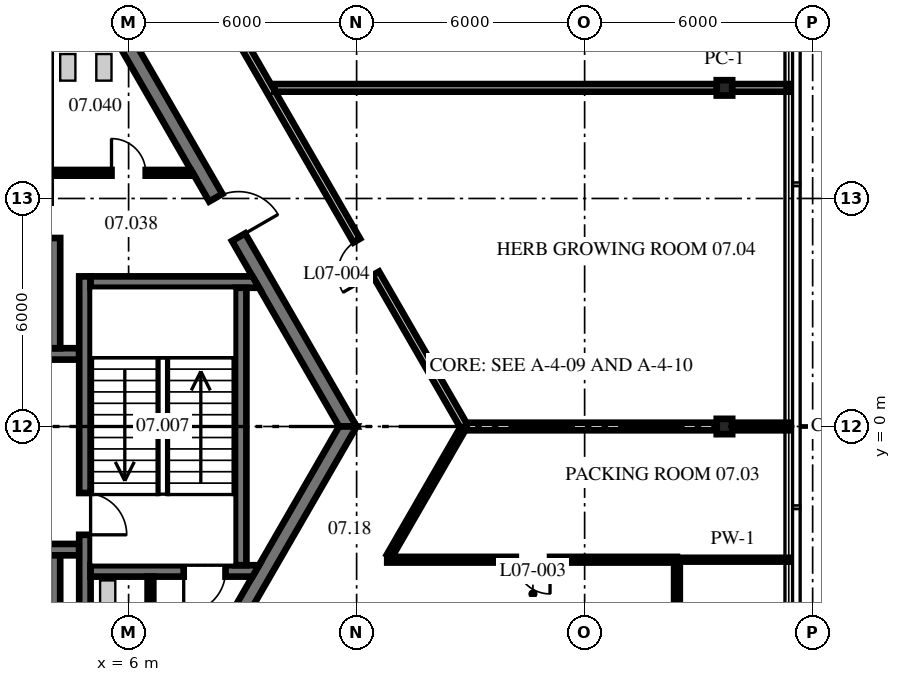
"""IFC4 building model, lengths in metres.
Left out: names, types, materials, properties, quantities, classifications, styles, units other than length and angle.
Written with IfcOpenShell. Run it as: python <this file> out.ifc"""

import sys

from ifc_helpers import new_model, si_unit, direction, frame, frame_2d, origin, origin_2d, place, context, subcontext, project, spatial, polyline, rectangle, i_section, outline, extrude, source, transform, mapped, element, fill, save


model = new_model("IFC4")
c1 = context("Model", 3, precision=1e-05, world=origin(), true_north=direction((0.0, 1.0)))
c2 = subcontext(c1, "Body", "Model", "MODEL_VIEW")
j1 = project(units=[si_unit("LENGTHUNIT", "METRE"), si_unit("PLANEANGLEUNIT", "RADIAN")], contexts=[c1])
p1 = place(None, origin())
s1 = spatial("IfcSite", under=j1, at=p1, CompositionType="ELEMENT")
p2 = place(p1, origin())
s2 = spatial("IfcBuilding", under=s1, at=p2, CompositionType="ELEMENT")
p3 = place(p2, frame((0.0, 0.0, 33.2)))
s3 = spatial("IfcBuildingStorey", under=s2, at=p3, CompositionType="ELEMENT", Elevation=33.2)
m1 = source(origin(), c2, "Body", "SweptSolid", [
    extrude(i_section(OverallWidth=0.404, OverallDepth=0.406, WebThickness=0.027, FlangeThickness=0.044, at=origin_2d()), origin(), (0.0, 0.0, 1.0), 4.3),
])
for number, where, z_axis, x_axis in (
    (1, (21.679, 0.0, 0.0), (0.0, 0.0, 1.0), (0.0, 1.0, 0.0)),
    (2, (21.679, 8.91, 0.0), (0.0, 0.0, 1.0), (0.0, 1.0, 0.0)),
):
    element("IfcColumn", number, at=place(p3, frame(where, z_axis=z_axis, x_axis=x_axis)), inside=s3, PredefinedType="COLUMN", context=c2, shape_type="MappedRepresentation", body=[
        mapped(m1, transform((0.0, 0.0, 0.0), scale=1.0)),
    ])
m2 = source(origin(), c2, "Body", "SweptSolid", [
    extrude(outline(polyline([(-0.115, -0.2), (11.885, -0.2), (11.654, 0.2), (0.115, 0.2), (-0.115, -0.2)])), origin(), (0.0, 0.0, 1.0), 4.1),
])
p4 = place(p3, frame((11.769, 0.0, 0.0), z_axis=(0.0, 0.0, 1.0), x_axis=(-0.499996592174, 0.866027371285, 0.0)))
e3 = element("IfcWall", 3, at=p4, inside=s3, PredefinedType="SHEAR", context=c2, shape_type="MappedRepresentation", body=[
    mapped(m2, transform((0.0, 0.0, 0.0), scale=1.0)),
])
p5 = place(p4, frame((5.75, 0.0, 0.0)))
e4 = element("IfcOpeningElement", 4, at=p5, cuts=e3, PredefinedType="OPENING", context=c2, shape_type="SweptSolid", body=[
    extrude(rectangle(XDim=1.2, YDim=2.1, at=frame_2d((0.6, 1.05))), frame((0.0, 0.21, 0.0), z_axis=(0.0, -1.0, 0.0), x_axis=(1.0, 0.0, 0.0)), (0.0, 0.0, 1.0), 0.42),
])
p6 = place(p3, frame((5.885, -10.192, 0.0), z_axis=(0.0, 0.0, 1.0), x_axis=(0.499996592174, 0.866027371285, 0.0)))
e5 = element("IfcWall", 5, at=p6, inside=s3, PredefinedType="SHEAR", context=c2, shape_type="MappedRepresentation", body=[
    mapped(m2, transform((0.0, 0.0, 0.0), scale=1.0)),
])
p7 = place(p6, frame((3.665, 0.0, 0.0)))
e6 = element("IfcOpeningElement", 6, at=p7, cuts=e5, PredefinedType="OPENING", context=c2, shape_type="SweptSolid", body=[
    extrude(rectangle(XDim=1.2, YDim=2.1, at=frame_2d((0.6, 1.05))), frame((0.0, 0.21, 0.0), z_axis=(0.0, -1.0, 0.0), x_axis=(1.0, 0.0, 0.0)), (0.0, 0.0, 1.0), 0.42),
])
m3 = source(origin(), c2, "Body", "SweptSolid", [
    extrude(rectangle(XDim=3.0, YDim=0.3, at=frame_2d((1.5, 0.0))), origin(), (0.0, 0.0, 1.0), 4.1),
])
p8 = place(p3, frame((1.7, 1.91, 0.0), z_axis=(0.0, 0.0, 1.0), x_axis=(1.0, 0.0, 0.0)))
e7 = element("IfcWall", 7, at=p8, inside=s3, PredefinedType="SHEAR", context=c2, shape_type="MappedRepresentation", body=[
    mapped(m3, transform((0.0, 0.0, 0.0), scale=1.0)),
])
p9 = place(p8, frame((0.55, 0.0, 0.0)))
e8 = element("IfcOpeningElement", 8, at=p9, cuts=e7, PredefinedType="OPENING", context=c2, shape_type="SweptSolid", body=[
    extrude(rectangle(XDim=1.1, YDim=2.1, at=frame_2d((0.55, 1.05))), frame((0.0, 0.16, 0.0), z_axis=(0.0, -1.0, 0.0), x_axis=(1.0, 0.0, 0.0)), (0.0, 0.0, 1.0), 0.32),
])
m4 = source(origin(), c2, "Body", "SweptSolid", [
    extrude(rectangle(XDim=2.9, YDim=0.3, at=frame_2d((1.45, 0.0))), origin(), (0.0, 0.0, 1.0), 4.1),
])
p10 = place(p3, frame((4.05, 2.06, 0.0), z_axis=(0.0, 0.0, 1.0), x_axis=(0.0, 1.0, 0.0)))
e9 = element("IfcWall", 9, at=p10, inside=s3, PredefinedType="SHEAR", context=c2, shape_type="MappedRepresentation", body=[
    mapped(m4, transform((0.0, 0.0, 0.0), scale=1.0)),
])
m5 = source(origin(), c2, "Body", "SweptSolid", [
    extrude(rectangle(XDim=12.8, YDim=0.3, at=frame_2d((6.4, 0.0))), origin(), (0.0, 0.0, 1.0), 4.1),
])
p11 = place(p3, frame((-8.1, -3.24, 0.0), z_axis=(0.0, 0.0, 1.0), x_axis=(1.0, 0.0, 0.0)))
e10 = element("IfcWall", 10, at=p11, inside=s3, PredefinedType="SHEAR", context=c2, shape_type="MappedRepresentation", body=[
    mapped(m5, transform((0.0, 0.0, 0.0), scale=1.0)),
])
p12 = place(p11, frame((0.913, 0.0, 0.0)))
e11 = element("IfcOpeningElement", 11, at=p12, cuts=e10, PredefinedType="OPENING", context=c2, shape_type="SweptSolid", body=[
    extrude(rectangle(XDim=0.9, YDim=2.1, at=frame_2d((0.45, 1.05))), frame((0.0, 0.16, 0.0), z_axis=(0.0, -1.0, 0.0), x_axis=(1.0, 0.0, 0.0)), (0.0, 0.0, 1.0), 0.32),
])
p13 = place(p11, frame((3.05, 0.0, 0.0)))
e12 = element("IfcOpeningElement", 12, at=p13, cuts=e10, PredefinedType="OPENING", context=c2, shape_type="SweptSolid", body=[
    extrude(rectangle(XDim=0.9, YDim=2.1, at=frame_2d((0.45, 1.05))), frame((0.0, 0.16, 0.0), z_axis=(0.0, -1.0, 0.0), x_axis=(1.0, 0.0, 0.0)), (0.0, 0.0, 1.0), 0.32),
])
p14 = place(p11, frame((6.587, 0.0, 0.0)))
e13 = element("IfcOpeningElement", 13, at=p14, cuts=e10, PredefinedType="OPENING", context=c2, shape_type="SweptSolid", body=[
    extrude(rectangle(XDim=0.9, YDim=2.1, at=frame_2d((0.45, 1.05))), frame((0.0, 0.16, 0.0), z_axis=(0.0, -1.0, 0.0), x_axis=(1.0, 0.0, 0.0)), (0.0, 0.0, 1.0), 0.32),
])
p15 = place(p11, frame((10.35, 0.0, 0.0)))
e14 = element("IfcOpeningElement", 14, at=p15, cuts=e10, PredefinedType="OPENING", context=c2, shape_type="SweptSolid", body=[
    extrude(rectangle(XDim=1.1, YDim=2.1, at=frame_2d((0.55, 1.05))), frame((0.0, 0.16, 0.0), z_axis=(0.0, -1.0, 0.0), x_axis=(1.0, 0.0, 0.0)), (0.0, 0.0, 1.0), 0.32),
])
m6 = source(origin(), c2, "Body", "SweptSolid", [
    extrude(rectangle(XDim=2.5, YDim=0.3, at=frame_2d((1.25, 0.0))), origin(), (0.0, 0.0, 1.0), 4.1),
])
p16 = place(p3, frame((4.05, -5.89, 0.0), z_axis=(0.0, 0.0, 1.0), x_axis=(0.0, 1.0, 0.0)))
e15 = element("IfcWall", 15, at=p16, inside=s3, PredefinedType="SHEAR", context=c2, shape_type="MappedRepresentation", body=[
    mapped(m6, transform((0.0, 0.0, 0.0), scale=1.0)),
])
m7 = source(origin(), c2, "Body", "SweptSolid", [
    extrude(outline(polyline([(-0.15, -0.15), (9.99, -0.15), (9.99, 0.15), (0.15, 0.15), (-0.15, -0.15)])), origin(), (0.0, 0.0, 1.0), 4.1),
])
p17 = place(p3, frame((4.85, -6.04, 0.0), z_axis=(0.0, 0.0, 1.0), x_axis=(0.0, 1.0, 0.0)))
e16 = element("IfcWall", 16, at=p17, inside=s3, PredefinedType="SHEAR", context=c2, shape_type="MappedRepresentation", body=[
    mapped(m7, transform((0.0, 0.0, 0.0), scale=1.0)),
])
p18 = place(p17, frame((3.19, 0.0, 0.0)))
e17 = element("IfcOpeningElement", 17, at=p18, cuts=e16, PredefinedType="OPENING", context=c2, shape_type="SweptSolid", body=[
    extrude(rectangle(XDim=1.1, YDim=2.1, at=frame_2d((0.55, 1.05))), frame((0.0, 0.16, 0.0), z_axis=(0.0, -1.0, 0.0), x_axis=(1.0, 0.0, 0.0)), (0.0, 0.0, 1.0), 0.32),
])
m8 = source(origin(), c2, "Body", "SweptSolid", [
    extrude(outline(polyline([(0.0, -0.15), (0.0, 0.15), (4.26, 0.15), (4.433, -0.15), (0.0, -0.15)])), origin(), (0.0, 0.0, 1.0), 4.1),
])
p19 = place(p3, frame((5.0, 3.8, 0.0), z_axis=(0.0, 0.0, 1.0), x_axis=(1.0, 0.0, 0.0)))
e18 = element("IfcWall", 18, at=p19, inside=s3, PredefinedType="SHEAR", context=c2, shape_type="MappedRepresentation", body=[
    mapped(m8, transform((0.0, 0.0, 0.0), scale=1.0)),
])
m9 = source(origin(), c2, "Body", "SweptSolid", [
    extrude(outline(polyline([(0.0, -0.15), (0.0, 0.15), (4.433, 0.15), (4.26, -0.15), (0.0, -0.15)])), origin(), (0.0, 0.0, 1.0), 4.1),
])
p20 = place(p3, frame((5.0, -3.8, 0.0), z_axis=(0.0, 0.0, 1.0), x_axis=(1.0, 0.0, 0.0)))
e19 = element("IfcWall", 19, at=p20, inside=s3, PredefinedType="SHEAR", context=c2, shape_type="MappedRepresentation", body=[
    mapped(m9, transform((0.0, 0.0, 0.0), scale=1.0)),
])
p21 = place(p20, frame((2.45, 0.0, 0.0)))
e20 = element("IfcOpeningElement", 20, at=p21, cuts=e19, PredefinedType="OPENING", context=c2, shape_type="SweptSolid", body=[
    extrude(rectangle(XDim=1.1, YDim=2.1, at=frame_2d((0.55, 1.05))), frame((0.0, 0.16, 0.0), z_axis=(0.0, -1.0, 0.0), x_axis=(1.0, 0.0, 0.0)), (0.0, 0.0, 1.0), 0.32),
])
m10 = source(origin(), c2, "Body", "SweptSolid", [
    extrude(rectangle(XDim=7.3, YDim=0.3, at=frame_2d((3.65, 0.0))), origin(), (0.0, 0.0, 1.0), 4.1),
])
p22 = place(p3, frame((8.95, -3.65, 0.0), z_axis=(0.0, 0.0, 1.0), x_axis=(0.0, 1.0, 0.0)))
e21 = element("IfcWall", 21, at=p22, inside=s3, PredefinedType="SHEAR", context=c2, shape_type="MappedRepresentation", body=[
    mapped(m10, transform((0.0, 0.0, 0.0), scale=1.0)),
])
m11 = source(origin(), c2, "Body", "SweptSolid", [
    extrude(outline(polyline([(0.0, -0.075), (0.0, 0.075), (3.693, 0.075), (3.78, -0.075), (0.0, -0.075)])), origin(), (0.0, 0.0, 1.0), 4.1),
])
p23 = place(p3, frame((3.95, 6.675, 0.0), z_axis=(0.0, 0.0, 1.0), x_axis=(1.0, 0.0, 0.0)))
e22 = element("IfcWall", 22, at=p23, inside=s3, PredefinedType="PARTITIONING", context=c2, shape_type="MappedRepresentation", body=[
    mapped(m11, transform((0.0, 0.0, 0.0), scale=1.0)),
])
p24 = place(p23, frame((1.6, 0.0, 0.0)))
e23 = element("IfcOpeningElement", 23, at=p24, cuts=e22, PredefinedType="OPENING", context=c2, shape_type="SweptSolid", body=[
    extrude(rectangle(XDim=0.9, YDim=2.1, at=frame_2d((0.45, 1.05))), frame((0.0, 0.085, 0.0), z_axis=(0.0, -1.0, 0.0), x_axis=(1.0, 0.0, 0.0)), (0.0, 0.0, 1.0), 0.17),
])
m12 = source(origin(), c2, "Body", "SweptSolid", [
    extrude(outline(polyline([(-0.075, -0.075), (2.24, -0.075), (2.24, 0.075), (0.075, 0.075), (-0.075, -0.075)])), origin(), (0.0, 0.0, 1.0), 4.1),
])
p25 = place(p3, frame((6.575, -6.19, 0.0), z_axis=(0.0, 0.0, 1.0), x_axis=(0.0, 1.0, 0.0)))
e24 = element("IfcWall", 24, at=p25, inside=s3, PredefinedType="PARTITIONING", context=c2, shape_type="MappedRepresentation", body=[
    mapped(m12, transform((0.0, 0.0, 0.0), scale=1.0)),
])
m13 = source(origin(), c2, "Body", "SweptSolid", [
    extrude(rectangle(XDim=14.759, YDim=0.2, at=frame_2d((7.379, 0.0))), origin(), (0.0, 0.0, 1.0), 4.1),
])
p26 = place(p3, frame((7.449, 12.782, 0.0), z_axis=(0.0, 0.0, 1.0), x_axis=(0.500005012202, -0.866022509969, 0.0)))
e25 = element("IfcWall", 25, at=p26, inside=s3, PredefinedType="PARTITIONING", context=c2, shape_type="MappedRepresentation", body=[
    mapped(m13, transform((0.0, 0.0, 0.0), scale=1.0)),
])
p27 = place(p26, frame((9.109, 0.0, 0.0)))
e26 = element("IfcOpeningElement", 26, at=p27, cuts=e25, PredefinedType="OPENING", context=c2, shape_type="SweptSolid", body=[
    extrude(rectangle(XDim=1.0, YDim=2.1, at=frame_2d((0.5, 1.05))), frame((0.0, 0.11, 0.0), z_axis=(0.0, -1.0, 0.0), x_axis=(1.0, 0.0, 0.0)), (0.0, 0.0, 1.0), 0.22),
])
p28 = place(p26, frame((1.721, 0.0, 0.0)))
e27 = element("IfcOpeningElement", 27, at=p28, cuts=e25, PredefinedType="OPENING", context=c2, shape_type="SweptSolid", body=[
    extrude(rectangle(XDim=1.0, YDim=2.1, at=frame_2d((0.5, 1.05))), frame((0.0, 0.11, 0.0), z_axis=(0.0, -1.0, 0.0), x_axis=(1.0, 0.0, 0.0)), (0.0, 0.0, 1.0), 0.22),
])
m14 = source(origin(), c2, "Body", "SweptSolid", [
    extrude(rectangle(XDim=7.624, YDim=0.15, at=frame_2d((3.812, 0.0))), origin(), (0.0, 0.0, 1.0), 4.1),
])
p29 = place(p3, frame((12.805, -3.505, 0.0), z_axis=(0.0, 0.0, 1.0), x_axis=(1.0, 0.0, 0.0)))
e28 = element("IfcWall", 28, at=p29, inside=s3, PredefinedType="PARTITIONING", context=c2, shape_type="MappedRepresentation", body=[
    mapped(m14, transform((0.0, 0.0, 0.0), scale=1.0)),
])
p30 = place(p29, frame((3.384, 0.0, 0.0)))
e29 = element("IfcOpeningElement", 29, at=p30, cuts=e28, PredefinedType="OPENING", context=c2, shape_type="SweptSolid", body=[
    extrude(rectangle(XDim=0.9, YDim=2.1, at=frame_2d((0.45, 1.05))), frame((0.0, 0.085, 0.0), z_axis=(0.0, -1.0, 0.0), x_axis=(1.0, 0.0, 0.0)), (0.0, 0.0, 1.0), 0.17),
])
m15 = source(origin(), c2, "Body", "SweptSolid", [
    extrude(rectangle(XDim=2.942, YDim=0.1, at=frame_2d((1.471, 0.0))), origin(), (0.0, 0.0, 1.0), 4.1),
])
p31 = place(p3, frame((20.429, -3.505, 0.0), z_axis=(0.0, 0.0, 1.0), x_axis=(1.0, 0.0, 0.0)))
e30 = element("IfcWall", 30, at=p31, inside=s3, PredefinedType="PARTITIONING", context=c2, shape_type="MappedRepresentation", body=[
    mapped(m15, transform((0.0, 0.0, 0.0), scale=1.0)),
])
m16 = source(origin(), c2, "Body", "SweptSolid", [
    extrude(rectangle(XDim=6.587, YDim=0.2, at=frame_2d((3.294, 0.0))), origin(), (0.0, 0.0, 1.0), 3.488),
])
p32 = place(p3, frame((14.899, 0.0, 0.0), z_axis=(0.0, 0.0, 1.0), x_axis=(1.0, 0.0, 0.0)))
e31 = element("IfcWall", 31, at=p32, inside=s3, PredefinedType="PARTITIONING", context=c2, shape_type="MappedRepresentation", body=[
    mapped(m16, transform((0.0, 0.0, 0.0), scale=1.0)),
])
m17 = source(origin(), c2, "Body", "SweptSolid", [
    extrude(rectangle(XDim=1.499, YDim=0.2, at=frame_2d((0.749, 0.0))), origin(), (0.0, 0.0, 1.0), 4.1),
])
p33 = place(p3, frame((21.873, 0.0, 0.0), z_axis=(0.0, 0.0, 1.0), x_axis=(1.0, 0.0, 0.0)))
e32 = element("IfcWall", 32, at=p33, inside=s3, PredefinedType="PARTITIONING", context=c2, shape_type="MappedRepresentation", body=[
    mapped(m17, transform((0.0, 0.0, 0.0), scale=1.0)),
])
m18 = source(origin(), c2, "Body", "SweptSolid", [
    extrude(rectangle(XDim=11.652, YDim=0.2, at=frame_2d((5.826, 0.0))), origin(), (0.0, 0.0, 1.0), 3.343),
])
p34 = place(p3, frame((9.835, 8.91, 0.0), z_axis=(0.0, 0.0, 1.0), x_axis=(1.0, 0.0, 0.0)))
e33 = element("IfcWall", 33, at=p34, inside=s3, PredefinedType="PARTITIONING", context=c2, shape_type="MappedRepresentation", body=[
    mapped(m18, transform((0.0, 0.0, 0.0), scale=1.0)),
])
p35 = place(p3, frame((21.873, 8.91, 0.0), z_axis=(0.0, 0.0, 1.0), x_axis=(1.0, 0.0, 0.0)))
e34 = element("IfcWall", 34, at=p35, inside=s3, PredefinedType="PARTITIONING", context=c2, shape_type="MappedRepresentation", body=[
    mapped(m17, transform((0.0, 0.0, 0.0), scale=1.0)),
])
m19 = source(origin(), c2, "Body", "SweptSolid", [
    extrude(rectangle(XDim=3.867, YDim=0.15, at=frame_2d((1.934, 0.0))), origin(), (0.0, 0.0, 1.0), 4.1),
])
p36 = place(p3, frame((12.86, -3.41, 0.0), z_axis=(0.0, 0.0, 1.0), x_axis=(0.499995691662, 0.86602789119, 0.0)))
e35 = element("IfcWall", 35, at=p36, inside=s3, PredefinedType="PARTITIONING", context=c2, shape_type="MappedRepresentation", body=[
    mapped(m19, transform((0.0, 0.0, 0.0), scale=1.0)),
])
m20 = source(origin(), c2, "Body", "SweptSolid", [
    extrude(rectangle(XDim=1.78, YDim=0.15, at=frame_2d((0.89, 0.0))), origin(), (0.0, 0.0, 1.0), 4.1),
])
p37 = place(p3, frame((20.429, -5.345, 0.0), z_axis=(0.0, 0.0, 1.0), x_axis=(0.0, 1.0, 0.0)))
e36 = element("IfcWall", 36, at=p37, inside=s3, PredefinedType="PARTITIONING", context=c2, shape_type="MappedRepresentation", body=[
    mapped(m20, transform((0.0, 0.0, 0.0), scale=1.0)),
])
p38 = place(p5, frame((1.2, 0.0, 0.0), z_axis=(0.0, 0.0, 1.0), x_axis=(-1.0, 0.0, 0.0)))
e37 = element("IfcDoor", 37, at=p38, inside=s3, OperationType="SINGLE_SWING_RIGHT", PredefinedType="DOOR", context=c2, shape_type="SweptSolid", body=[
    extrude(rectangle(XDim=1.2, YDim=2.1, at=frame_2d((0.6, 1.05))), frame((0.0, 0.025, 0.0), z_axis=(0.0, -1.0, 0.0), x_axis=(1.0, 0.0, 0.0)), (0.0, 0.0, 1.0), 0.05),
])
fill(e4, e37)
p39 = place(p18, frame((1.1, 0.0, 0.0), z_axis=(0.0, 0.0, 1.0), x_axis=(-1.0, 0.0, 0.0)))
e38 = element("IfcDoor", 38, at=p39, inside=s3, OperationType="SINGLE_SWING_RIGHT", PredefinedType="DOOR", context=c2, shape_type="SweptSolid", body=[
    extrude(rectangle(XDim=1.1, YDim=2.1, at=frame_2d((0.55, 1.05))), frame((0.0, 0.025, 0.0), z_axis=(0.0, -1.0, 0.0), x_axis=(1.0, 0.0, 0.0)), (0.0, 0.0, 1.0), 0.05),
])
fill(e17, e38)
p40 = place(p21, frame((1.1, 0.0, 0.0), z_axis=(0.0, 0.0, 1.0), x_axis=(-1.0, 0.0, 0.0)))
e39 = element("IfcDoor", 39, at=p40, inside=s3, OperationType="SINGLE_SWING_RIGHT", PredefinedType="DOOR", context=c2, shape_type="SweptSolid", body=[
    extrude(rectangle(XDim=1.1, YDim=2.1, at=frame_2d((0.55, 1.05))), frame((0.0, 0.025, 0.0), z_axis=(0.0, -1.0, 0.0), x_axis=(1.0, 0.0, 0.0)), (0.0, 0.0, 1.0), 0.05),
])
fill(e20, e39)
p41 = place(p24, origin())
e40 = element("IfcDoor", 40, at=p41, inside=s3, OperationType="SINGLE_SWING_LEFT", PredefinedType="DOOR", context=c2, shape_type="SweptSolid", body=[
    extrude(rectangle(XDim=0.9, YDim=2.1, at=frame_2d((0.45, 1.05))), frame((0.0, 0.025, 0.0), z_axis=(0.0, -1.0, 0.0), x_axis=(1.0, 0.0, 0.0)), (0.0, 0.0, 1.0), 0.05),
])
fill(e23, e40)
p42 = place(p30, origin())
e41 = element("IfcDoor", 41, at=p42, inside=s3, OperationType="SINGLE_SWING_RIGHT", PredefinedType="DOOR", context=c2, shape_type="SweptSolid", body=[
    extrude(rectangle(XDim=0.9, YDim=2.1, at=frame_2d((0.45, 1.05))), frame((0.0, 0.025, 0.0), z_axis=(0.0, -1.0, 0.0), x_axis=(1.0, 0.0, 0.0)), (0.0, 0.0, 1.0), 0.05),
])
fill(e29, e41)
p43 = place(p27, origin())
e42 = element("IfcDoor", 42, at=p43, inside=s3, OperationType="SINGLE_SWING_RIGHT", PredefinedType="DOOR", context=c2, shape_type="SweptSolid", body=[
    extrude(rectangle(XDim=1.0, YDim=2.1, at=frame_2d((0.5, 1.05))), frame((0.0, 0.025, 0.0), z_axis=(0.0, -1.0, 0.0), x_axis=(1.0, 0.0, 0.0)), (0.0, 0.0, 1.0), 0.05),
])
fill(e26, e42)
save(model, sys.argv[1])
